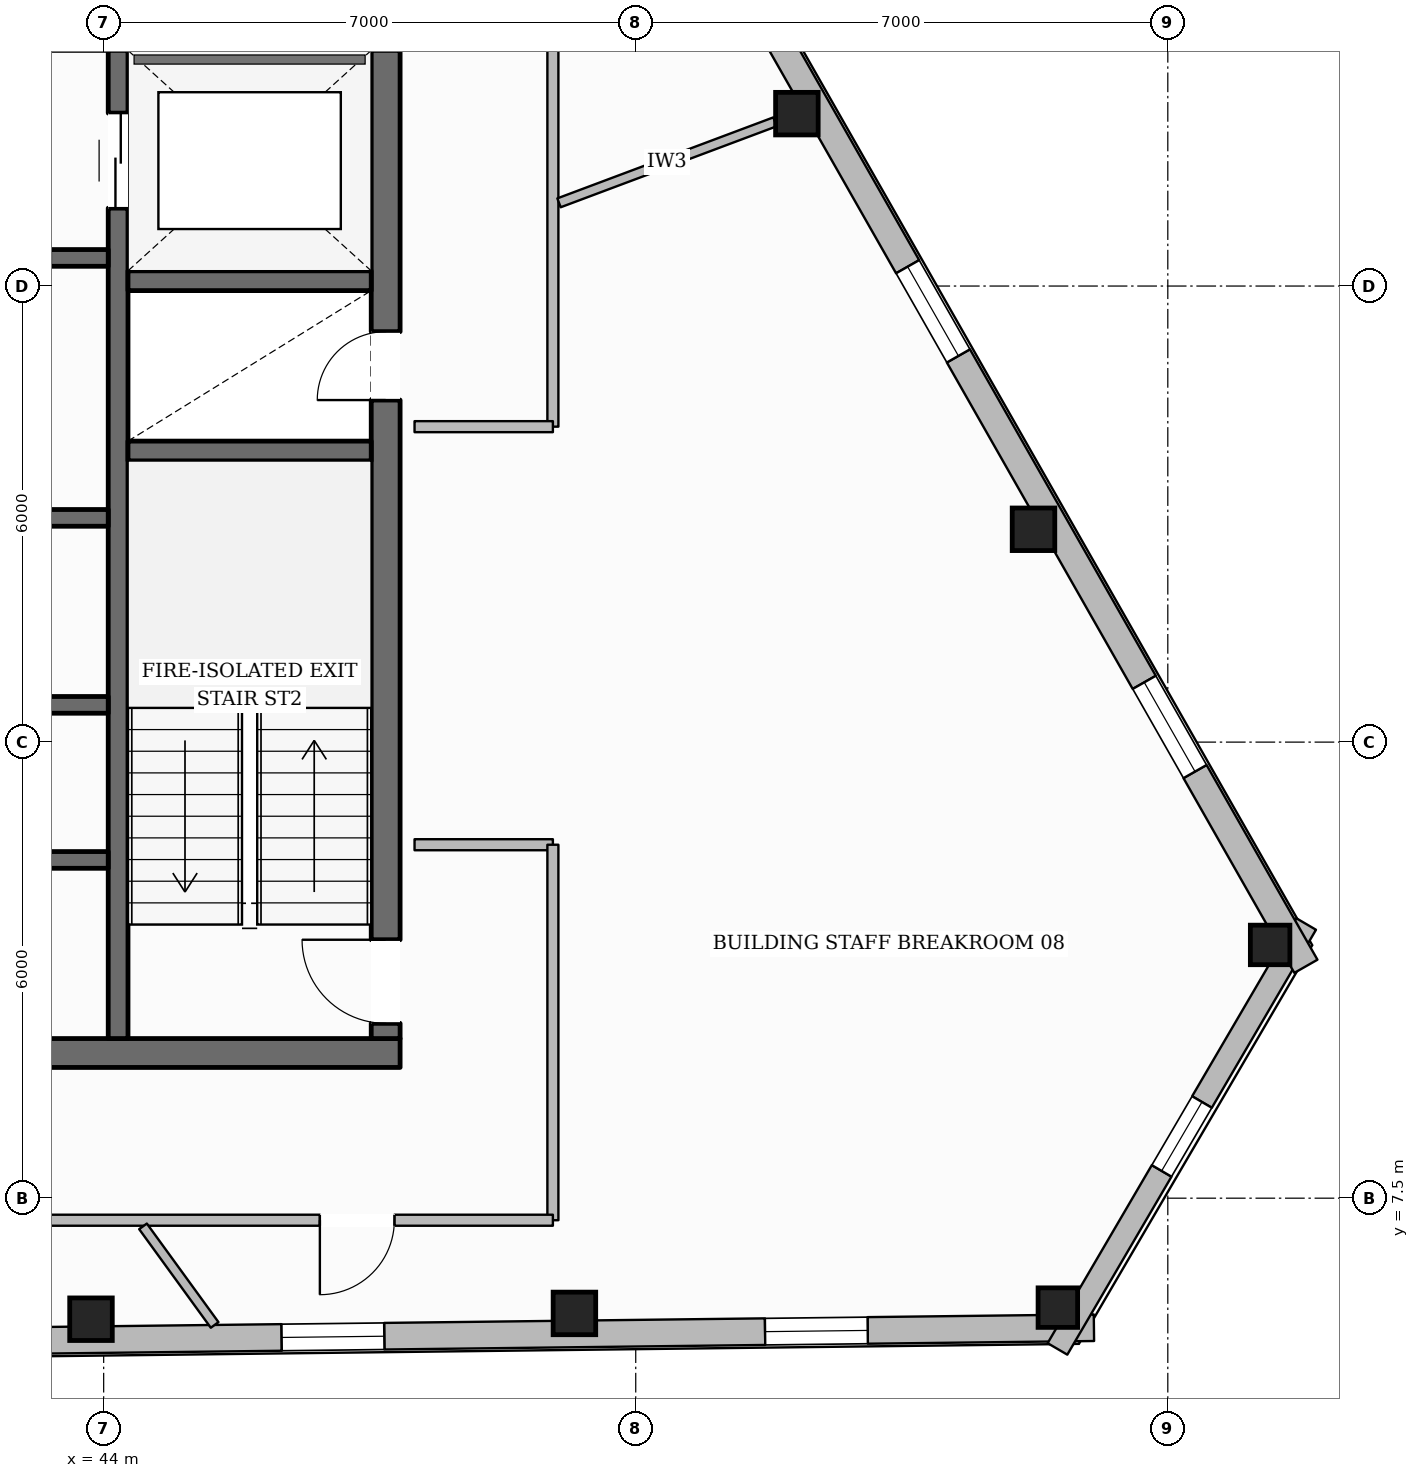
"""IFC4 building model, lengths in metres.
Left out: names, types, materials, properties, quantities, classifications, styles, units other than length and angle.
Written with IfcOpenShell. Run it as: python <this file> out.ifc"""

import sys

from ifc_helpers import new_model, si_unit, direction, frame, frame_2d, origin, origin_2d, place, context, subcontext, project, spatial, rectangle, hollow_rectangle, extrude, element, fill, save


model = new_model("IFC4")
c1 = context("Model", 3, precision=1e-05, world=origin(), true_north=direction((0.0, 1.0)))
c2 = subcontext(c1, "Body", "Model", "MODEL_VIEW")
j1 = project(units=[si_unit("LENGTHUNIT", "METRE"), si_unit("PLANEANGLEUNIT", "RADIAN")], contexts=[c1])
p1 = place(None, origin())
s1 = spatial("IfcSite", under=j1, at=p1, CompositionType="ELEMENT")
p2 = place(p1, origin())
s2 = spatial("IfcBuilding", under=s1, at=p2, CompositionType="ELEMENT")
p3 = place(p2, frame((0.0, 0.0, 289.55)))
s3 = spatial("IfcBuildingStorey", under=s2, at=p3, CompositionType="ELEMENT", Elevation=289.55)
p4 = place(p3, frame((28.1, 9.41, 0.0), z_axis=(0.0, 0.0, 1.0), x_axis=(1.0, 0.0, 0.0)))
e1 = element("IfcWall", 1, at=p4, inside=s3, PredefinedType="SOLIDWALL", context=c2, shape_type="SweptSolid", body=[
    extrude(rectangle(XDim=19.8, YDim=0.38, at=frame_2d((9.9, 0.0))), origin(), (0.0, 0.0, 1.0), 3.61),
])
p5 = place(p4, frame((10.4, 0.0, 0.0)))
e2 = element("IfcOpeningElement", 2, at=p5, cuts=e1, PredefinedType="OPENING", context=c2, shape_type="SweptSolid", body=[
    extrude(rectangle(XDim=1.4, YDim=2.2, at=frame_2d((0.7, 1.1))), frame((0.0, 0.2, 0.0), z_axis=(0.0, -1.0, 0.0), x_axis=(1.0, 0.0, 0.0)), (0.0, 0.0, 1.0), 0.4),
])
p6 = place(p3, frame((47.71, 9.6, 0.0), z_axis=(0.0, 0.0, 1.0), x_axis=(0.0, 1.0, 0.0)))
e3 = element("IfcWall", 3, at=p6, inside=s3, PredefinedType="SOLIDWALL", context=c2, shape_type="SweptSolid", body=[
    extrude(rectangle(XDim=13.0, YDim=0.38, at=frame_2d((6.5, 0.0))), origin(), (0.0, 0.0, 1.0), 3.61),
])
p7 = place(p6, frame((0.2, 0.0, 0.0)))
e4 = element("IfcOpeningElement", 4, at=p7, cuts=e3, PredefinedType="OPENING", context=c2, shape_type="SweptSolid", body=[
    extrude(rectangle(XDim=1.1, YDim=2.15, at=frame_2d((0.55, 1.075))), frame((0.0, 0.2, 0.0), z_axis=(0.0, -1.0, 0.0), x_axis=(1.0, 0.0, 0.0)), (0.0, 0.0, 1.0), 0.4),
])
p8 = place(p6, frame((8.4, 0.0, 0.0)))
e5 = element("IfcOpeningElement", 5, at=p8, cuts=e3, PredefinedType="OPENING", context=c2, shape_type="SweptSolid", body=[
    extrude(rectangle(XDim=0.9, YDim=2.1, at=frame_2d((0.45, 1.05))), frame((0.0, 0.2, 0.0), z_axis=(0.0, -1.0, 0.0), x_axis=(1.0, 0.0, 0.0)), (0.0, 0.0, 1.0), 0.4),
])
p9 = place(p3, frame((44.19, 9.6, 0.0), z_axis=(0.0, 0.0, 1.0), x_axis=(0.0, 1.0, 0.0)))
e6 = element("IfcWall", 6, at=p9, inside=s3, PredefinedType="SHEAR", context=c2, shape_type="SweptSolid", body=[
    extrude(rectangle(XDim=13.0, YDim=0.26, at=frame_2d((6.5, 0.0))), origin(), (0.0, 0.0, 1.0), 3.61),
])
p10 = place(p9, frame((10.925, 0.0, 0.0)))
e7 = element("IfcOpeningElement", 7, at=p10, cuts=e6, PredefinedType="OPENING", context=c2, shape_type="SweptSolid", body=[
    extrude(rectangle(XDim=1.25, YDim=2.25, at=frame_2d((0.625, 1.125))), frame((0.0, 0.14, 0.0), z_axis=(0.0, -1.0, 0.0), x_axis=(1.0, 0.0, 0.0)), (0.0, 0.0, 1.0), 0.28),
])
for number, where, z_axis, x_axis in (
    (8, (44.32, 17.33, 0.0), (0.0, 0.0, 1.0), (1.0, 0.0, 0.0)),
    (9, (44.32, 19.57, 0.0), (0.0, 0.0, 1.0), (1.0, 0.0, 0.0)),
):
    element("IfcWall", number, at=place(p3, frame(where, z_axis=z_axis, x_axis=x_axis)), inside=s3, PredefinedType="SHEAR", context=c2, shape_type="SweptSolid", body=[
        extrude(rectangle(XDim=3.2, YDim=0.26, at=frame_2d((1.6, 0.0))), origin(), (0.0, 0.0, 1.0), 3.61),
    ])
p11 = place(p3, frame((31.94, 19.87, 0.0), z_axis=(0.0, 0.0, 1.0), x_axis=(1.0, 0.0, 0.0)))
e10 = element("IfcWall", 10, at=p11, inside=s3, PredefinedType="SOLIDWALL", context=c2, shape_type="SweptSolid", body=[
    extrude(rectangle(XDim=12.12, YDim=0.22, at=frame_2d((6.06, 0.0))), origin(), (0.0, 0.0, 1.0), 3.61),
])
p12 = place(p11, frame((6.3, 0.0, 0.0)))
e11 = element("IfcOpeningElement", 11, at=p12, cuts=e10, PredefinedType="OPENING", context=c2, shape_type="SweptSolid", body=[
    extrude(rectangle(XDim=1.1, YDim=2.15, at=frame_2d((0.55, 1.075))), frame((0.0, 0.12, 0.0), z_axis=(0.0, -1.0, 0.0), x_axis=(1.0, 0.0, 0.0)), (0.0, 0.0, 1.0), 0.24),
])
p13 = place(p11, frame((8.23, 0.0, 0.0)))
e12 = element("IfcOpeningElement", 12, at=p13, cuts=e10, PredefinedType="OPENING", context=c2, shape_type="SweptSolid", body=[
    extrude(rectangle(XDim=0.9, YDim=2.1, at=frame_2d((0.45, 1.05))), frame((0.0, 0.12, 0.0), z_axis=(0.0, -1.0, 0.0), x_axis=(1.0, 0.0, 0.0)), (0.0, 0.0, 1.0), 0.24),
])
p14 = place(p11, frame((10.45, 0.0, 0.0)))
e13 = element("IfcOpeningElement", 13, at=p14, cuts=e10, PredefinedType="OPENING", context=c2, shape_type="SweptSolid", body=[
    extrude(rectangle(XDim=0.9, YDim=2.1, at=frame_2d((0.45, 1.05))), frame((0.0, 0.12, 0.0), z_axis=(0.0, -1.0, 0.0), x_axis=(1.0, 0.0, 0.0)), (0.0, 0.0, 1.0), 0.24),
])
p15 = place(p3, frame((31.94, 16.45, 0.0), z_axis=(0.0, 0.0, 1.0), x_axis=(1.0, 0.0, 0.0)))
e14 = element("IfcWall", 14, at=p15, inside=s3, PredefinedType="SOLIDWALL", context=c2, shape_type="SweptSolid", body=[
    extrude(rectangle(XDim=12.12, YDim=0.22, at=frame_2d((6.06, 0.0))), origin(), (0.0, 0.0, 1.0), 3.61),
])
p16 = place(p3, frame((31.94, 13.99, 0.0), z_axis=(0.0, 0.0, 1.0), x_axis=(1.0, 0.0, 0.0)))
e15 = element("IfcWall", 15, at=p16, inside=s3, PredefinedType="SOLIDWALL", context=c2, shape_type="SweptSolid", body=[
    extrude(rectangle(XDim=12.12, YDim=0.22, at=frame_2d((6.06, 0.0))), origin(), (0.0, 0.0, 1.0), 3.61),
])
p17 = place(p16, frame((1.11, 0.0, 0.0)))
e16 = element("IfcOpeningElement", 16, at=p17, cuts=e15, PredefinedType="OPENING", context=c2, shape_type="SweptSolid", body=[
    extrude(rectangle(XDim=0.9, YDim=2.1, at=frame_2d((0.45, 1.05))), frame((0.0, 0.12, 0.0), z_axis=(0.0, -1.0, 0.0), x_axis=(1.0, 0.0, 0.0)), (0.0, 0.0, 1.0), 0.24),
])
p18 = place(p16, frame((5.16, 0.0, 0.0)))
e17 = element("IfcOpeningElement", 17, at=p18, cuts=e15, PredefinedType="OPENING", context=c2, shape_type="SweptSolid", body=[
    extrude(rectangle(XDim=0.9, YDim=2.1, at=frame_2d((0.45, 1.05))), frame((0.0, 0.12, 0.0), z_axis=(0.0, -1.0, 0.0), x_axis=(1.0, 0.0, 0.0)), (0.0, 0.0, 1.0), 0.24),
])
p19 = place(p16, frame((9.61, 0.0, 0.0)))
e18 = element("IfcOpeningElement", 18, at=p19, cuts=e15, PredefinedType="OPENING", context=c2, shape_type="SweptSolid", body=[
    extrude(rectangle(XDim=0.9, YDim=2.1, at=frame_2d((0.45, 1.05))), frame((0.0, 0.12, 0.0), z_axis=(0.0, -1.0, 0.0), x_axis=(1.0, 0.0, 0.0)), (0.0, 0.0, 1.0), 0.24),
])
p20 = place(p3, frame((40.28, 11.95, 0.0), z_axis=(0.0, 0.0, 1.0), x_axis=(1.0, 0.0, 0.0)))
e19 = element("IfcWall", 19, at=p20, inside=s3, PredefinedType="SOLIDWALL", context=c2, shape_type="SweptSolid", body=[
    extrude(rectangle(XDim=3.78, YDim=0.22, at=frame_2d((1.89, 0.0))), origin(), (0.0, 0.0, 1.0), 3.61),
])
p21 = place(p20, frame((1.55, 0.0, 0.0)))
e20 = element("IfcOpeningElement", 20, at=p21, cuts=e19, PredefinedType="OPENING", context=c2, shape_type="SweptSolid", body=[
    extrude(rectangle(XDim=0.9, YDim=2.1, at=frame_2d((0.45, 1.05))), frame((0.0, 0.12, 0.0), z_axis=(0.0, -1.0, 0.0), x_axis=(1.0, 0.0, 0.0)), (0.0, 0.0, 1.0), 0.24),
])
for number, where, z_axis, x_axis in (
    (21, (43.833, 5.908, 0.0), (0.0, 0.0, 1.0), (1.0, 0.0, 0.0)),
    (22, (50.193, 5.984, 0.0), (0.0, 0.0, 1.0), (1.0, 0.0, 0.0)),
):
    element("IfcColumn", number, at=place(p3, frame(where, z_axis=z_axis, x_axis=x_axis)), inside=s3, PredefinedType="COLUMN", context=c2, shape_type="SweptSolid", body=[
        extrude(hollow_rectangle(XDim=0.56, YDim=0.56, WallThickness=0.025, at=origin_2d()), origin(), (0.0, 0.0, 1.0), 3.61),
    ])
for number, where, z_axis, x_axis in (
    (23, (56.553, 6.06, 0.0), (0.0, 0.0, 1.0), (1.0, 0.0, 0.0)),
    (24, (59.346, 10.832, 0.0), (0.0, 0.0, 1.0), (1.0, 0.0, 0.0)),
):
    element("IfcColumn", number, at=place(p3, frame(where, z_axis=z_axis, x_axis=x_axis)), inside=s3, PredefinedType="COLUMN", context=c2, shape_type="SweptSolid", body=[
        extrude(hollow_rectangle(XDim=0.52, YDim=0.52, WallThickness=0.024, at=origin_2d()), origin(), (0.0, 0.0, 1.0), 3.61),
    ])
for number, where, z_axis, x_axis in (
    (25, (56.233, 16.3, 0.0), (0.0, 0.0, 1.0), (1.0, 0.0, 0.0)),
    (26, (53.12, 21.768, 0.0), (0.0, 0.0, 1.0), (1.0, 0.0, 0.0)),
):
    element("IfcColumn", number, at=place(p3, frame(where, z_axis=z_axis, x_axis=x_axis)), inside=s3, PredefinedType="COLUMN", context=c2, shape_type="SweptSolid", body=[
        extrude(hollow_rectangle(XDim=0.56, YDim=0.56, WallThickness=0.025, at=origin_2d()), origin(), (0.0, 0.0, 1.0), 3.61),
    ])
p22 = place(p3, frame((57.028, 5.796, 0.0), z_axis=(0.0, 0.0, 1.0), x_axis=(-0.999928125145, -0.011989351295, 0.0)))
e27 = element("IfcWall", 27, at=p22, inside=s3, PredefinedType="STANDARD", context=c2, shape_type="SweptSolid", body=[
    extrude(rectangle(XDim=39.118, YDim=0.35, at=frame_2d((19.559, 0.0))), origin(), (0.0, 0.0, 1.0), 3.196),
])
p23 = place(p22, frame((34.779, 0.0, 0.65)))
e28 = element("IfcOpeningElement", 28, at=p23, cuts=e27, PredefinedType="OPENING", context=c2, shape_type="SweptSolid", body=[
    extrude(rectangle(XDim=1.35, YDim=1.75, at=frame_2d((0.675, 0.875))), frame((0.0, 0.185, 0.0), z_axis=(0.0, -1.0, 0.0), x_axis=(1.0, 0.0, 0.0)), (0.0, 0.0, 1.0), 0.37),
])
p24 = place(p22, frame((28.419, 0.0, 0.65)))
e29 = element("IfcOpeningElement", 29, at=p24, cuts=e27, PredefinedType="OPENING", context=c2, shape_type="SweptSolid", body=[
    extrude(rectangle(XDim=1.35, YDim=1.75, at=frame_2d((0.675, 0.875))), frame((0.0, 0.185, 0.0), z_axis=(0.0, -1.0, 0.0), x_axis=(1.0, 0.0, 0.0)), (0.0, 0.0, 1.0), 0.37),
])
p25 = place(p22, frame((15.698, 0.0, 0.65)))
e30 = element("IfcOpeningElement", 30, at=p25, cuts=e27, PredefinedType="OPENING", context=c2, shape_type="SweptSolid", body=[
    extrude(rectangle(XDim=1.35, YDim=1.75, at=frame_2d((0.675, 0.875))), frame((0.0, 0.185, 0.0), z_axis=(0.0, -1.0, 0.0), x_axis=(1.0, 0.0, 0.0)), (0.0, 0.0, 1.0), 0.37),
])
p26 = place(p22, frame((9.337, 0.0, 0.65)))
e31 = element("IfcOpeningElement", 31, at=p26, cuts=e27, PredefinedType="OPENING", context=c2, shape_type="SweptSolid", body=[
    extrude(rectangle(XDim=1.35, YDim=1.75, at=frame_2d((0.675, 0.875))), frame((0.0, 0.185, 0.0), z_axis=(0.0, -1.0, 0.0), x_axis=(1.0, 0.0, 0.0)), (0.0, 0.0, 1.0), 0.37),
])
p27 = place(p22, frame((2.977, 0.0, 0.65)))
e32 = element("IfcOpeningElement", 32, at=p27, cuts=e27, PredefinedType="OPENING", context=c2, shape_type="SweptSolid", body=[
    extrude(rectangle(XDim=1.35, YDim=1.75, at=frame_2d((0.675, 0.875))), frame((0.0, 0.185, 0.0), z_axis=(0.0, -1.0, 0.0), x_axis=(1.0, 0.0, 0.0)), (0.0, 0.0, 1.0), 0.37),
])
p28 = place(p3, frame((59.82, 11.107, 0.0), z_axis=(0.0, 0.0, 1.0), x_axis=(-0.50511963023, -0.863049337614, 0.0)))
e33 = element("IfcWall", 33, at=p28, inside=s3, PredefinedType="STANDARD", context=c2, shape_type="SweptSolid", body=[
    extrude(rectangle(XDim=6.477, YDim=0.3, at=frame_2d((3.239, 0.0))), origin(), (0.0, 0.0, 1.0), 3.196),
])
p29 = place(p28, frame((2.714, 0.0, 0.65)))
e34 = element("IfcOpeningElement", 34, at=p29, cuts=e33, PredefinedType="OPENING", context=c2, shape_type="SweptSolid", body=[
    extrude(rectangle(XDim=1.05, YDim=1.7, at=frame_2d((0.525, 0.85))), frame((0.0, 0.16, 0.0), z_axis=(0.0, -1.0, 0.0), x_axis=(1.0, 0.0, 0.0)), (0.0, 0.0, 1.0), 0.32),
])
p30 = place(p3, frame((40.664, 44.194, 0.0), z_axis=(0.0, 0.0, 1.0), x_axis=(0.494747407388, -0.869036824814, 0.0)))
e35 = element("IfcWall", 35, at=p30, inside=s3, PredefinedType="STANDARD", context=c2, shape_type="SweptSolid", body=[
    extrude(rectangle(XDim=38.713, YDim=0.35, at=frame_2d((19.357, 0.0))), origin(), (0.0, 0.0, 1.0), 3.196),
])
p31 = place(p30, frame((34.415, 0.0, 0.65)))
e36 = element("IfcOpeningElement", 36, at=p31, cuts=e35, PredefinedType="OPENING", context=c2, shape_type="SweptSolid", body=[
    extrude(rectangle(XDim=1.35, YDim=1.75, at=frame_2d((0.675, 0.875))), frame((0.0, 0.185, 0.0), z_axis=(0.0, -1.0, 0.0), x_axis=(1.0, 0.0, 0.0)), (0.0, 0.0, 1.0), 0.37),
])
p32 = place(p30, frame((28.123, 0.0, 0.65)))
e37 = element("IfcOpeningElement", 37, at=p32, cuts=e35, PredefinedType="OPENING", context=c2, shape_type="SweptSolid", body=[
    extrude(rectangle(XDim=1.35, YDim=1.75, at=frame_2d((0.675, 0.875))), frame((0.0, 0.185, 0.0), z_axis=(0.0, -1.0, 0.0), x_axis=(1.0, 0.0, 0.0)), (0.0, 0.0, 1.0), 0.37),
])
p33 = place(p30, frame((15.539, 0.0, 0.65)))
e38 = element("IfcOpeningElement", 38, at=p33, cuts=e35, PredefinedType="OPENING", context=c2, shape_type="SweptSolid", body=[
    extrude(rectangle(XDim=1.35, YDim=1.75, at=frame_2d((0.675, 0.875))), frame((0.0, 0.185, 0.0), z_axis=(0.0, -1.0, 0.0), x_axis=(1.0, 0.0, 0.0)), (0.0, 0.0, 1.0), 0.37),
])
p34 = place(p30, frame((9.246, 0.0, 0.65)))
e39 = element("IfcOpeningElement", 39, at=p34, cuts=e35, PredefinedType="OPENING", context=c2, shape_type="SweptSolid", body=[
    extrude(rectangle(XDim=1.35, YDim=1.75, at=frame_2d((0.675, 0.875))), frame((0.0, 0.185, 0.0), z_axis=(0.0, -1.0, 0.0), x_axis=(1.0, 0.0, 0.0)), (0.0, 0.0, 1.0), 0.37),
])
p35 = place(p30, frame((2.954, 0.0, 0.65)))
e40 = element("IfcOpeningElement", 40, at=p35, cuts=e35, PredefinedType="OPENING", context=c2, shape_type="SweptSolid", body=[
    extrude(rectangle(XDim=1.35, YDim=1.75, at=frame_2d((0.675, 0.875))), frame((0.0, 0.185, 0.0), z_axis=(0.0, -1.0, 0.0), x_axis=(1.0, 0.0, 0.0)), (0.0, 0.0, 1.0), 0.37),
])
p36 = place(p3, frame((49.91, 24.99, 0.0), z_axis=(0.0, 0.0, 1.0), x_axis=(0.0, -1.0, 0.0)))
e41 = element("IfcWall", 41, at=p36, inside=s3, PredefinedType="PARTITIONING", context=c2, shape_type="SweptSolid", body=[
    extrude(rectangle(XDim=7.34, YDim=0.145, at=frame_2d((3.67, 0.0))), origin(), (0.0, 0.0, 1.0), 3.349),
])
for number, where, z_axis, x_axis in (
    (42, (49.91, 17.65, 0.0), (0.0, 0.0, 1.0), (-1.0, 0.0, 0.0)),
    (43, (48.09, 12.15, 0.0), (0.0, 0.0, 1.0), (1.0, 0.0, 0.0)),
):
    element("IfcWall", number, at=place(p3, frame(where, z_axis=z_axis, x_axis=x_axis)), inside=s3, PredefinedType="PARTITIONING", context=c2, shape_type="SweptSolid", body=[
        extrude(rectangle(XDim=1.82, YDim=0.145, at=frame_2d((0.91, 0.0))), origin(), (0.0, 0.0, 1.0), 3.61),
    ])
p37 = place(p3, frame((49.91, 12.15, 0.0), z_axis=(0.0, 0.0, 1.0), x_axis=(0.0, -1.0, 0.0)))
e44 = element("IfcWall", 44, at=p37, inside=s3, PredefinedType="PARTITIONING", context=c2, shape_type="SweptSolid", body=[
    extrude(rectangle(XDim=4.94, YDim=0.145, at=frame_2d((2.47, 0.0))), origin(), (0.0, 0.0, 1.0), 3.61),
])
p38 = place(p3, frame((49.91, 7.21, 0.0), z_axis=(0.0, 0.0, 1.0), x_axis=(-1.0, 0.0, 0.0)))
e45 = element("IfcWall", 45, at=p38, inside=s3, PredefinedType="PARTITIONING", context=c2, shape_type="SweptSolid", body=[
    extrude(rectangle(XDim=23.82, YDim=0.145, at=frame_2d((11.91, 0.0))), origin(), (0.0, 0.0, 1.0), 3.349),
])
p39 = place(p38, frame((10.932, 0.0, 0.0)))
e46 = element("IfcOpeningElement", 46, at=p39, cuts=e45, PredefinedType="OPENING", context=c2, shape_type="SweptSolid", body=[
    extrude(rectangle(XDim=0.98, YDim=2.15, at=frame_2d((0.49, 1.075))), frame((0.0, 0.083, 0.0), z_axis=(0.0, -1.0, 0.0), x_axis=(1.0, 0.0, 0.0)), (0.0, 0.0, 1.0), 0.165),
])
p40 = place(p38, frame((2.086, 0.0, 0.0)))
e47 = element("IfcOpeningElement", 47, at=p40, cuts=e45, PredefinedType="OPENING", context=c2, shape_type="SweptSolid", body=[
    extrude(rectangle(XDim=0.98, YDim=2.15, at=frame_2d((0.49, 1.075))), frame((0.0, 0.083, 0.0), z_axis=(0.0, -1.0, 0.0), x_axis=(1.0, 0.0, 0.0)), (0.0, 0.0, 1.0), 0.165),
])
p41 = place(p3, frame((49.99, 20.595, 0.0), z_axis=(0.0, 0.0, 1.0), x_axis=(0.936372151361, 0.351008823472, 0.0)))
e48 = element("IfcWall", 48, at=p41, inside=s3, PredefinedType="PARTITIONING", context=c2, shape_type="SweptSolid", body=[
    extrude(rectangle(XDim=3.035, YDim=0.125, at=frame_2d((1.517, 0.0))), origin(), (0.0, 0.0, 1.0), 3.61),
])
p42 = place(p3, frame((44.518, 7.129, 0.0), z_axis=(0.0, 0.0, 1.0), x_axis=(0.587773247584, -0.80902571617, 0.0)))
e49 = element("IfcWall", 49, at=p42, inside=s3, PredefinedType="PARTITIONING", context=c2, shape_type="SweptSolid", body=[
    extrude(rectangle(XDim=1.603, YDim=0.125, at=frame_2d((0.802, 0.0))), origin(), (0.0, 0.0, 1.0), 3.61),
])
p43 = place(p26, origin())
e50 = element("IfcWindow", 50, at=p43, inside=s3, PartitioningType="SINGLE_PANEL", PredefinedType="WINDOW", context=c2, shape_type="SweptSolid", body=[
    extrude(rectangle(XDim=1.35, YDim=1.75, at=frame_2d((0.675, 0.875))), frame((0.0, 0.03, 0.0), z_axis=(0.0, -1.0, 0.0), x_axis=(1.0, 0.0, 0.0)), (0.0, 0.0, 1.0), 0.06),
])
fill(e31, e50)
p44 = place(p27, origin())
e51 = element("IfcWindow", 51, at=p44, inside=s3, PartitioningType="SINGLE_PANEL", PredefinedType="WINDOW", context=c2, shape_type="SweptSolid", body=[
    extrude(rectangle(XDim=1.35, YDim=1.75, at=frame_2d((0.675, 0.875))), frame((0.0, 0.03, 0.0), z_axis=(0.0, -1.0, 0.0), x_axis=(1.0, 0.0, 0.0)), (0.0, 0.0, 1.0), 0.06),
])
fill(e32, e51)
p45 = place(p31, origin())
e52 = element("IfcWindow", 52, at=p45, inside=s3, PartitioningType="SINGLE_PANEL", PredefinedType="WINDOW", context=c2, shape_type="SweptSolid", body=[
    extrude(rectangle(XDim=1.35, YDim=1.75, at=frame_2d((0.675, 0.875))), frame((0.0, 0.03, 0.0), z_axis=(0.0, -1.0, 0.0), x_axis=(1.0, 0.0, 0.0)), (0.0, 0.0, 1.0), 0.06),
])
fill(e36, e52)
p46 = place(p32, origin())
e53 = element("IfcWindow", 53, at=p46, inside=s3, PartitioningType="SINGLE_PANEL", PredefinedType="WINDOW", context=c2, shape_type="SweptSolid", body=[
    extrude(rectangle(XDim=1.35, YDim=1.75, at=frame_2d((0.675, 0.875))), frame((0.0, 0.03, 0.0), z_axis=(0.0, -1.0, 0.0), x_axis=(1.0, 0.0, 0.0)), (0.0, 0.0, 1.0), 0.06),
])
fill(e37, e53)
p47 = place(p29, origin())
e54 = element("IfcWindow", 54, at=p47, inside=s3, PartitioningType="SINGLE_PANEL", PredefinedType="WINDOW", context=c2, shape_type="SweptSolid", body=[
    extrude(rectangle(XDim=1.05, YDim=1.7, at=frame_2d((0.525, 0.85))), frame((0.0, 0.03, 0.0), z_axis=(0.0, -1.0, 0.0), x_axis=(1.0, 0.0, 0.0)), (0.0, 0.0, 1.0), 0.06),
])
fill(e34, e54)
p48 = place(p7, origin())
e55 = element("IfcDoor", 55, at=p48, inside=s3, OperationType="SINGLE_SWING_RIGHT", PredefinedType="DOOR", context=c2, shape_type="SweptSolid", body=[
    extrude(rectangle(XDim=1.1, YDim=2.15, at=frame_2d((0.55, 1.075))), frame((0.0, 0.025, 0.0), z_axis=(0.0, -1.0, 0.0), x_axis=(1.0, 0.0, 0.0)), (0.0, 0.0, 1.0), 0.05),
])
fill(e4, e55)
p49 = place(p8, origin())
e56 = element("IfcDoor", 56, at=p49, inside=s3, OperationType="SINGLE_SWING_LEFT", PredefinedType="DOOR", context=c2, shape_type="SweptSolid", body=[
    extrude(rectangle(XDim=0.9, YDim=2.1, at=frame_2d((0.45, 1.05))), frame((0.0, 0.025, 0.0), z_axis=(0.0, -1.0, 0.0), x_axis=(1.0, 0.0, 0.0)), (0.0, 0.0, 1.0), 0.05),
])
fill(e5, e56)
p50 = place(p10, origin())
e57 = element("IfcDoor", 57, at=p50, inside=s3, OperationType="DOUBLE_DOOR_SLIDING", PredefinedType="DOOR", context=c2, shape_type="SweptSolid", body=[
    extrude(rectangle(XDim=1.25, YDim=2.25, at=frame_2d((0.625, 1.125))), frame((0.0, 0.025, 0.0), z_axis=(0.0, -1.0, 0.0), x_axis=(1.0, 0.0, 0.0)), (0.0, 0.0, 1.0), 0.05),
])
fill(e7, e57)
p51 = place(p40, origin())
e58 = element("IfcDoor", 58, at=p51, inside=s3, OperationType="SINGLE_SWING_RIGHT", PredefinedType="DOOR", context=c2, shape_type="SweptSolid", body=[
    extrude(rectangle(XDim=0.98, YDim=2.15, at=frame_2d((0.49, 1.075))), frame((0.0, 0.025, 0.0), z_axis=(0.0, -1.0, 0.0), x_axis=(1.0, 0.0, 0.0)), (0.0, 0.0, 1.0), 0.05),
])
fill(e47, e58)
save(model, sys.argv[1])
